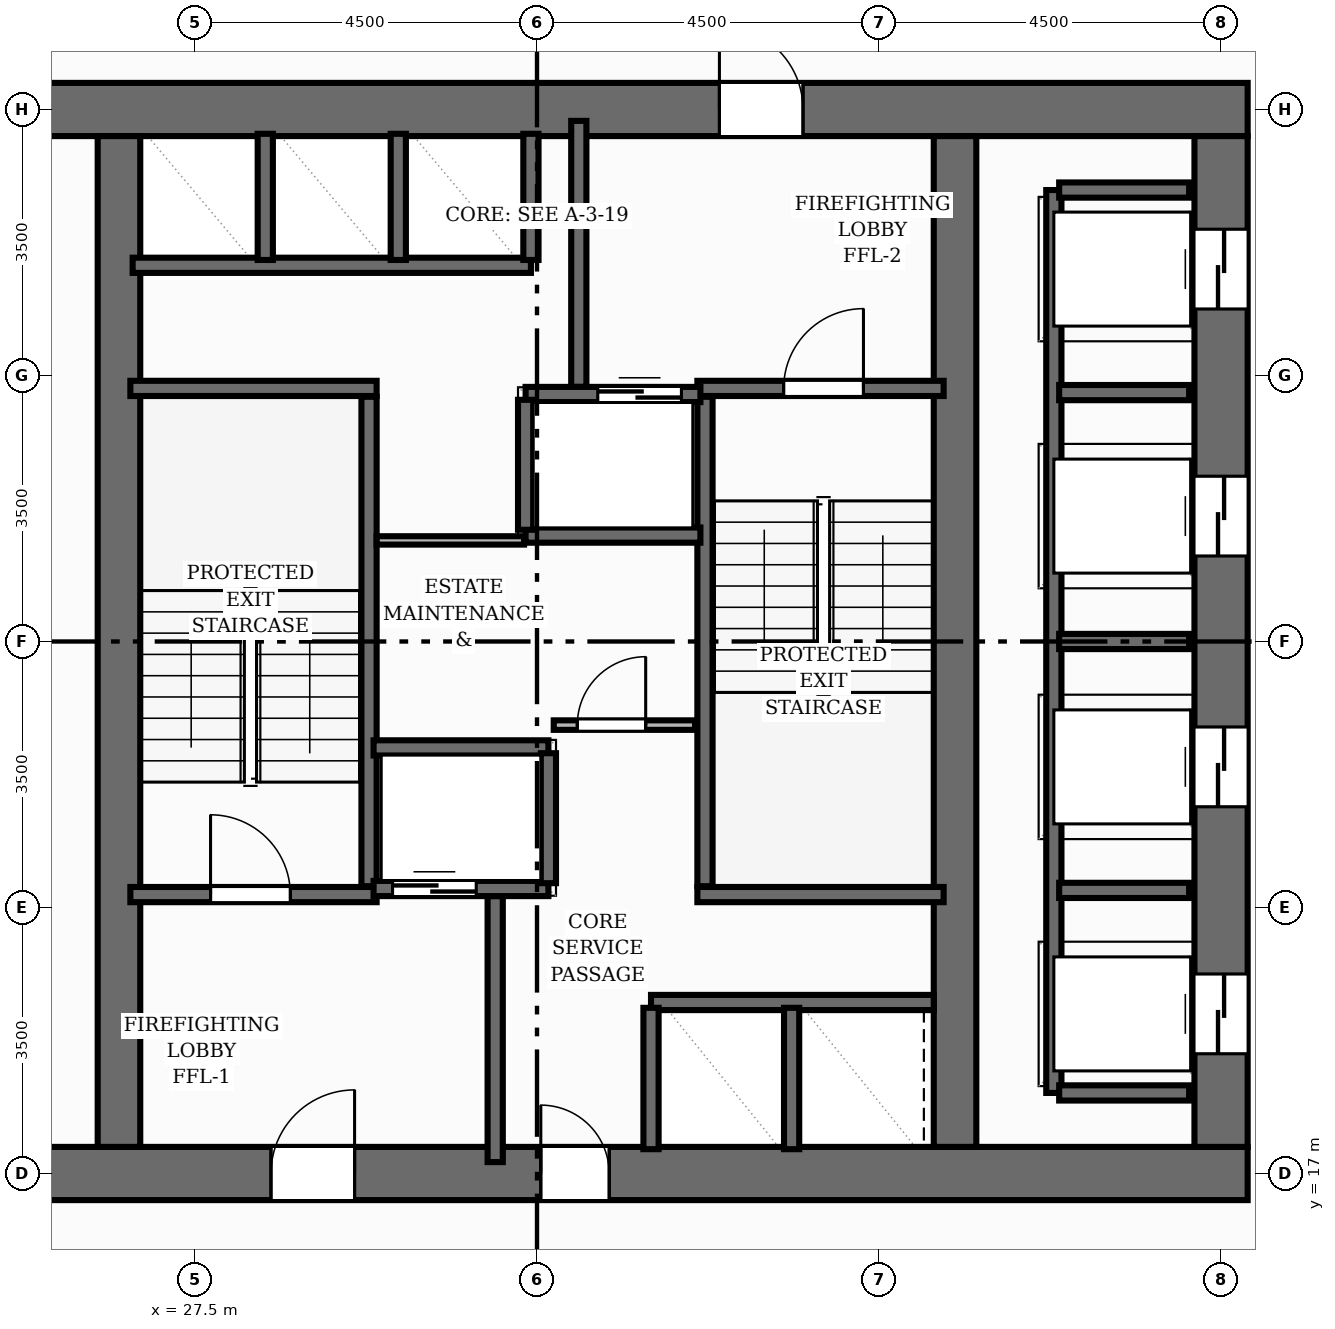
"""IFC4 building model, lengths in metres.
Left out: names, types, materials, properties, quantities, classifications, styles, units other than length and angle.
Written with IfcOpenShell. Run it as: python <this file> out.ifc"""

import sys

from ifc_helpers import new_model, si_unit, direction, frame, frame_2d, origin, place, context, subcontext, project, spatial, rectangle, extrude, element, fill, save


model = new_model("IFC4")
c1 = context("Model", 3, precision=1e-05, world=origin(), true_north=direction((0.0, 1.0)))
c2 = subcontext(c1, "Body", "Model", "MODEL_VIEW")
j1 = project(units=[si_unit("LENGTHUNIT", "METRE"), si_unit("PLANEANGLEUNIT", "RADIAN")], contexts=[c1])
p1 = place(None, origin())
s1 = spatial("IfcSite", under=j1, at=p1, CompositionType="ELEMENT")
p2 = place(p1, origin())
s2 = spatial("IfcBuilding", under=s1, at=p2, CompositionType="ELEMENT")
p3 = place(p2, frame((0.0, 0.0, 70.88)))
s3 = spatial("IfcBuildingStorey", under=s2, at=p3, CompositionType="ELEMENT", Elevation=70.88)
p4 = place(p3, frame((22.65, 17.0, 0.0), z_axis=(0.0, 0.0, 1.0), x_axis=(1.0, 0.0, 0.0)))
e1 = element("IfcWall", 1, at=p4, inside=s3, PredefinedType="SHEAR", context=c2, shape_type="SweptSolid", body=[
    extrude(rectangle(XDim=18.7, YDim=0.7, at=frame_2d((9.35, 0.0))), origin(), (0.0, 0.0, 1.0), 3.2),
])
p5 = place(p4, frame((5.85, 0.0, 0.0)))
e2 = element("IfcOpeningElement", 2, at=p5, cuts=e1, PredefinedType="OPENING", context=c2, shape_type="SweptSolid", body=[
    extrude(rectangle(XDim=1.1, YDim=2.15, at=frame_2d((0.55, 1.075))), frame((0.0, 0.36, 0.0), z_axis=(0.0, -1.0, 0.0), x_axis=(1.0, 0.0, 0.0)), (0.0, 0.0, 1.0), 0.72),
])
p6 = place(p4, frame((9.4, 0.0, 0.0)))
e3 = element("IfcOpeningElement", 3, at=p6, cuts=e1, PredefinedType="OPENING", context=c2, shape_type="SweptSolid", body=[
    extrude(rectangle(XDim=0.9, YDim=2.1, at=frame_2d((0.45, 1.05))), frame((0.0, 0.36, 0.0), z_axis=(0.0, -1.0, 0.0), x_axis=(1.0, 0.0, 0.0)), (0.0, 0.0, 1.0), 0.72),
])
p7 = place(p3, frame((22.65, 31.0, 0.0), z_axis=(0.0, 0.0, 1.0), x_axis=(1.0, 0.0, 0.0)))
e4 = element("IfcWall", 4, at=p7, inside=s3, PredefinedType="SHEAR", context=c2, shape_type="SweptSolid", body=[
    extrude(rectangle(XDim=18.7, YDim=0.7, at=frame_2d((9.35, 0.0))), origin(), (0.0, 0.0, 1.0), 3.2),
])
p8 = place(p7, frame((11.75, 0.0, 0.0)))
e5 = element("IfcOpeningElement", 5, at=p8, cuts=e4, PredefinedType="OPENING", context=c2, shape_type="SweptSolid", body=[
    extrude(rectangle(XDim=1.1, YDim=2.15, at=frame_2d((0.55, 1.075))), frame((0.0, 0.36, 0.0), z_axis=(0.0, -1.0, 0.0), x_axis=(1.0, 0.0, 0.0)), (0.0, 0.0, 1.0), 0.72),
])
p9 = place(p3, frame((41.0, 17.35, 0.0), z_axis=(0.0, 0.0, 1.0), x_axis=(0.0, 1.0, 0.0)))
e6 = element("IfcWall", 6, at=p9, inside=s3, PredefinedType="SHEAR", context=c2, shape_type="SweptSolid", body=[
    extrude(rectangle(XDim=13.3, YDim=0.7, at=frame_2d((6.65, 0.0))), origin(), (0.0, 0.0, 1.0), 3.2),
])
p10 = place(p9, frame((1.225, 0.0, 0.0)))
e7 = element("IfcOpeningElement", 7, at=p10, cuts=e6, PredefinedType="OPENING", context=c2, shape_type="SweptSolid", body=[
    extrude(rectangle(XDim=1.05, YDim=2.15, at=frame_2d((0.525, 1.075))), frame((0.0, 0.36, 0.0), z_axis=(0.0, -1.0, 0.0), x_axis=(1.0, 0.0, 0.0)), (0.0, 0.0, 1.0), 0.72),
])
p11 = place(p9, frame((4.475, 0.0, 0.0)))
e8 = element("IfcOpeningElement", 8, at=p11, cuts=e6, PredefinedType="OPENING", context=c2, shape_type="SweptSolid", body=[
    extrude(rectangle(XDim=1.05, YDim=2.15, at=frame_2d((0.525, 1.075))), frame((0.0, 0.36, 0.0), z_axis=(0.0, -1.0, 0.0), x_axis=(1.0, 0.0, 0.0)), (0.0, 0.0, 1.0), 0.72),
])
p12 = place(p9, frame((7.775, 0.0, 0.0)))
e9 = element("IfcOpeningElement", 9, at=p12, cuts=e6, PredefinedType="OPENING", context=c2, shape_type="SweptSolid", body=[
    extrude(rectangle(XDim=1.05, YDim=2.15, at=frame_2d((0.525, 1.075))), frame((0.0, 0.36, 0.0), z_axis=(0.0, -1.0, 0.0), x_axis=(1.0, 0.0, 0.0)), (0.0, 0.0, 1.0), 0.72),
])
p13 = place(p9, frame((11.025, 0.0, 0.0)))
e10 = element("IfcOpeningElement", 10, at=p13, cuts=e6, PredefinedType="OPENING", context=c2, shape_type="SweptSolid", body=[
    extrude(rectangle(XDim=1.05, YDim=2.15, at=frame_2d((0.525, 1.075))), frame((0.0, 0.36, 0.0), z_axis=(0.0, -1.0, 0.0), x_axis=(1.0, 0.0, 0.0)), (0.0, 0.0, 1.0), 0.72),
])
for number, where, z_axis, x_axis in (
    (11, (26.5, 17.35, 0.0), (0.0, 0.0, 1.0), (0.0, 1.0, 0.0)),
    (12, (37.5, 17.35, 0.0), (0.0, 0.0, 1.0), (0.0, 1.0, 0.0)),
):
    element("IfcWall", number, at=place(p3, frame(where, z_axis=z_axis, x_axis=x_axis)), inside=s3, PredefinedType="SHEAR", context=c2, shape_type="SweptSolid", body=[
        extrude(rectangle(XDim=13.3, YDim=0.56, at=frame_2d((6.65, 0.0))), origin(), (0.0, 0.0, 1.0), 3.2),
    ])
p14 = place(p3, frame((29.79, 20.78, 0.0), z_axis=(0.0, 0.0, 1.0), x_axis=(0.0, 1.0, 0.0)))
e13 = element("IfcWall", 13, at=p14, inside=s3, PredefinedType="SHEAR", context=c2, shape_type="SweptSolid", body=[
    extrude(rectangle(XDim=6.44, YDim=0.2, at=frame_2d((3.22, 0.0))), origin(), (0.0, 0.0, 1.0), 3.2),
])
p15 = place(p3, frame((26.65, 27.33, 0.0), z_axis=(0.0, 0.0, 1.0), x_axis=(1.0, 0.0, 0.0)))
e14 = element("IfcWall", 14, at=p15, inside=s3, PredefinedType="SHEAR", context=c2, shape_type="SweptSolid", body=[
    extrude(rectangle(XDim=3.24, YDim=0.2, at=frame_2d((1.62, 0.0))), origin(), (0.0, 0.0, 1.0), 3.2),
])
p16 = place(p3, frame((26.65, 20.67, 0.0), z_axis=(0.0, 0.0, 1.0), x_axis=(1.0, 0.0, 0.0)))
e15 = element("IfcWall", 15, at=p16, inside=s3, PredefinedType="SHEAR", context=c2, shape_type="SweptSolid", body=[
    extrude(rectangle(XDim=3.24, YDim=0.2, at=frame_2d((1.62, 0.0))), origin(), (0.0, 0.0, 1.0), 3.2),
])
p17 = place(p16, frame((1.055, 0.0, 0.0)))
e16 = element("IfcOpeningElement", 16, at=p17, cuts=e15, PredefinedType="OPENING", context=c2, shape_type="SweptSolid", body=[
    extrude(rectangle(XDim=1.05, YDim=2.15, at=frame_2d((0.525, 1.075))), frame((0.0, 0.11, 0.0), z_axis=(0.0, -1.0, 0.0), x_axis=(1.0, 0.0, 0.0)), (0.0, 0.0, 1.0), 0.22),
])
p18 = place(p3, frame((34.21, 20.78, 0.0), z_axis=(0.0, 0.0, 1.0), x_axis=(0.0, 1.0, 0.0)))
e17 = element("IfcWall", 17, at=p18, inside=s3, PredefinedType="SHEAR", context=c2, shape_type="SweptSolid", body=[
    extrude(rectangle(XDim=6.44, YDim=0.2, at=frame_2d((3.22, 0.0))), origin(), (0.0, 0.0, 1.0), 3.2),
])
p19 = place(p3, frame((34.11, 20.67, 0.0), z_axis=(0.0, 0.0, 1.0), x_axis=(1.0, 0.0, 0.0)))
e18 = element("IfcWall", 18, at=p19, inside=s3, PredefinedType="SHEAR", context=c2, shape_type="SweptSolid", body=[
    extrude(rectangle(XDim=3.24, YDim=0.2, at=frame_2d((1.62, 0.0))), origin(), (0.0, 0.0, 1.0), 3.2),
])
p20 = place(p3, frame((34.11, 27.33, 0.0), z_axis=(0.0, 0.0, 1.0), x_axis=(1.0, 0.0, 0.0)))
e19 = element("IfcWall", 19, at=p20, inside=s3, PredefinedType="SHEAR", context=c2, shape_type="SweptSolid", body=[
    extrude(rectangle(XDim=3.24, YDim=0.2, at=frame_2d((1.62, 0.0))), origin(), (0.0, 0.0, 1.0), 3.2),
])
p21 = place(p20, frame((1.135, 0.0, 0.0)))
e20 = element("IfcOpeningElement", 20, at=p21, cuts=e19, PredefinedType="OPENING", context=c2, shape_type="SweptSolid", body=[
    extrude(rectangle(XDim=1.05, YDim=2.15, at=frame_2d((0.525, 1.075))), frame((0.0, 0.11, 0.0), z_axis=(0.0, -1.0, 0.0), x_axis=(1.0, 0.0, 0.0)), (0.0, 0.0, 1.0), 0.22),
])
for number, where, z_axis, x_axis in (
    (21, (31.45, 17.15, 0.0), (0.0, 0.0, 1.0), (0.0, 1.0, 0.0)),
    (22, (32.55, 27.35, 0.0), (0.0, 0.0, 1.0), (0.0, 1.0, 0.0)),
):
    element("IfcWall", number, at=place(p3, frame(where, z_axis=z_axis, x_axis=x_axis)), inside=s3, PredefinedType="SHEAR", context=c2, shape_type="SweptSolid", body=[
        extrude(rectangle(XDim=3.5, YDim=0.2, at=frame_2d((1.75, 0.0))), origin(), (0.0, 0.0, 1.0), 3.2),
    ])
p22 = place(p3, frame((29.85, 20.75, 0.0), z_axis=(0.0, 0.0, 1.0), x_axis=(1.0, 0.0, 0.0)))
e23 = element("IfcWall", 23, at=p22, inside=s3, PredefinedType="SHEAR", context=c2, shape_type="SweptSolid", body=[
    extrude(rectangle(XDim=2.3, YDim=0.2, at=frame_2d((1.15, 0.0))), origin(), (0.0, 0.0, 1.0), 3.2),
])
p23 = place(p22, frame((0.25, 0.0, 0.0)))
e24 = element("IfcOpeningElement", 24, at=p23, cuts=e23, PredefinedType="OPENING", context=c2, shape_type="SweptSolid", body=[
    extrude(rectangle(XDim=1.1, YDim=2.15, at=frame_2d((0.55, 1.075))), frame((0.0, 0.11, 0.0), z_axis=(0.0, -1.0, 0.0), x_axis=(1.0, 0.0, 0.0)), (0.0, 0.0, 1.0), 0.22),
])
p24 = place(p3, frame((29.85, 22.6, 0.0), z_axis=(0.0, 0.0, 1.0), x_axis=(1.0, 0.0, 0.0)))
e25 = element("IfcWall", 25, at=p24, inside=s3, PredefinedType="SHEAR", context=c2, shape_type="SweptSolid", body=[
    extrude(rectangle(XDim=2.3, YDim=0.2, at=frame_2d((1.15, 0.0))), origin(), (0.0, 0.0, 1.0), 3.2),
])
p25 = place(p3, frame((32.15, 20.82, 0.0), z_axis=(0.0, 0.0, 1.0), x_axis=(0.0, 1.0, 0.0)))
e26 = element("IfcWall", 26, at=p25, inside=s3, PredefinedType="SHEAR", context=c2, shape_type="SweptSolid", body=[
    extrude(rectangle(XDim=1.71, YDim=0.2, at=frame_2d((0.855, 0.0))), origin(), (0.0, 0.0, 1.0), 3.2),
])
p26 = place(p3, frame((31.85, 27.25, 0.0), z_axis=(0.0, 0.0, 1.0), x_axis=(1.0, 0.0, 0.0)))
e27 = element("IfcWall", 27, at=p26, inside=s3, PredefinedType="SHEAR", context=c2, shape_type="SweptSolid", body=[
    extrude(rectangle(XDim=2.3, YDim=0.2, at=frame_2d((1.15, 0.0))), origin(), (0.0, 0.0, 1.0), 3.2),
])
p27 = place(p26, frame((0.95, 0.0, 0.0)))
e28 = element("IfcOpeningElement", 28, at=p27, cuts=e27, PredefinedType="OPENING", context=c2, shape_type="SweptSolid", body=[
    extrude(rectangle(XDim=1.1, YDim=2.15, at=frame_2d((0.55, 1.075))), frame((0.0, 0.11, 0.0), z_axis=(0.0, -1.0, 0.0), x_axis=(1.0, 0.0, 0.0)), (0.0, 0.0, 1.0), 0.22),
])
p28 = place(p3, frame((31.85, 25.4, 0.0), z_axis=(0.0, 0.0, 1.0), x_axis=(1.0, 0.0, 0.0)))
e29 = element("IfcWall", 29, at=p28, inside=s3, PredefinedType="SHEAR", context=c2, shape_type="SweptSolid", body=[
    extrude(rectangle(XDim=2.3, YDim=0.2, at=frame_2d((1.15, 0.0))), origin(), (0.0, 0.0, 1.0), 3.2),
])
p29 = place(p3, frame((31.85, 25.47, 0.0), z_axis=(0.0, 0.0, 1.0), x_axis=(0.0, 1.0, 0.0)))
e30 = element("IfcWall", 30, at=p29, inside=s3, PredefinedType="SHEAR", context=c2, shape_type="SweptSolid", body=[
    extrude(rectangle(XDim=1.71, YDim=0.2, at=frame_2d((0.855, 0.0))), origin(), (0.0, 0.0, 1.0), 3.2),
])
p30 = place(p3, frame((38.8, 18.06, 0.0), z_axis=(0.0, 0.0, 1.0), x_axis=(0.0, 1.0, 0.0)))
e31 = element("IfcWall", 31, at=p30, inside=s3, PredefinedType="SHEAR", context=c2, shape_type="SweptSolid", body=[
    extrude(rectangle(XDim=11.88, YDim=0.2, at=frame_2d((5.94, 0.0))), origin(), (0.0, 0.0, 1.0), 3.2),
])
for number, where, z_axis, x_axis in (
    (32, (38.87, 18.06, 0.0), (0.0, 0.0, 1.0), (1.0, 0.0, 0.0)),
    (33, (38.87, 29.94, 0.0), (0.0, 0.0, 1.0), (1.0, 0.0, 0.0)),
    (34, (38.87, 20.725, 0.0), (0.0, 0.0, 1.0), (1.0, 0.0, 0.0)),
    (35, (38.87, 24.0, 0.0), (0.0, 0.0, 1.0), (1.0, 0.0, 0.0)),
    (36, (38.87, 27.275, 0.0), (0.0, 0.0, 1.0), (1.0, 0.0, 0.0)),
):
    element("IfcWall", number, at=place(p3, frame(where, z_axis=z_axis, x_axis=x_axis)), inside=s3, PredefinedType="SHEAR", context=c2, shape_type="SweptSolid", body=[
        extrude(rectangle(XDim=1.71, YDim=0.2, at=frame_2d((0.855, 0.0))), origin(), (0.0, 0.0, 1.0), 3.2),
    ])
p31 = place(p3, frame((26.68, 28.95, 0.0), z_axis=(0.0, 0.0, 1.0), x_axis=(1.0, 0.0, 0.0)))
e37 = element("IfcWall", 37, at=p31, inside=s3, PredefinedType="SHEAR", context=c2, shape_type="SweptSolid", body=[
    extrude(rectangle(XDim=5.24, YDim=0.2, at=frame_2d((2.62, 0.0))), origin(), (0.0, 0.0, 1.0), 3.2),
])
for number, where, z_axis, x_axis in (
    (38, (31.92, 29.02, 0.0), (0.0, 0.0, 1.0), (0.0, 1.0, 0.0)),
    (39, (28.425, 29.02, 0.0), (0.0, 0.0, 1.0), (0.0, 1.0, 0.0)),
    (40, (30.175, 29.02, 0.0), (0.0, 0.0, 1.0), (0.0, 1.0, 0.0)),
):
    element("IfcWall", number, at=place(p3, frame(where, z_axis=z_axis, x_axis=x_axis)), inside=s3, PredefinedType="SHEAR", context=c2, shape_type="SweptSolid", body=[
        extrude(rectangle(XDim=1.66, YDim=0.2, at=frame_2d((0.83, 0.0))), origin(), (0.0, 0.0, 1.0), 3.2),
    ])
p32 = place(p3, frame((33.5, 19.25, 0.0), z_axis=(0.0, 0.0, 1.0), x_axis=(1.0, 0.0, 0.0)))
e41 = element("IfcWall", 41, at=p32, inside=s3, PredefinedType="SHEAR", context=c2, shape_type="SweptSolid", body=[
    extrude(rectangle(XDim=3.72, YDim=0.2, at=frame_2d((1.86, 0.0))), origin(), (0.0, 0.0, 1.0), 3.2),
])
for number, where, z_axis, x_axis in (
    (42, (33.5, 17.32, 0.0), (0.0, 0.0, 1.0), (0.0, 1.0, 0.0)),
    (43, (35.35, 17.32, 0.0), (0.0, 0.0, 1.0), (0.0, 1.0, 0.0)),
):
    element("IfcWall", number, at=place(p3, frame(where, z_axis=z_axis, x_axis=x_axis)), inside=s3, PredefinedType="SHEAR", context=c2, shape_type="SweptSolid", body=[
        extrude(rectangle(XDim=1.86, YDim=0.2, at=frame_2d((0.93, 0.0))), origin(), (0.0, 0.0, 1.0), 3.2),
    ])
p33 = place(p3, frame((32.22, 22.9, 0.0), z_axis=(0.0, 0.0, 1.0), x_axis=(1.0, 0.0, 0.0)))
e44 = element("IfcWall", 44, at=p33, inside=s3, PredefinedType="PARTITIONING", context=c2, shape_type="SweptSolid", body=[
    extrude(rectangle(XDim=1.86, YDim=0.125, at=frame_2d((0.93, 0.0))), origin(), (0.0, 0.0, 1.0), 2.955),
])
p34 = place(p33, frame((0.31, 0.0, 0.0)))
e45 = element("IfcOpeningElement", 45, at=p34, cuts=e44, PredefinedType="OPENING", context=c2, shape_type="SweptSolid", body=[
    extrude(rectangle(XDim=0.9, YDim=2.1, at=frame_2d((0.45, 1.05))), frame((0.0, 0.073, 0.0), z_axis=(0.0, -1.0, 0.0), x_axis=(1.0, 0.0, 0.0)), (0.0, 0.0, 1.0), 0.145),
])
p35 = place(p3, frame((29.89, 25.33, 0.0), z_axis=(0.0, 0.0, 1.0), x_axis=(1.0, 0.0, 0.0)))
e46 = element("IfcWall", 46, at=p35, inside=s3, PredefinedType="MOVABLE", context=c2, shape_type="SweptSolid", body=[
    extrude(rectangle(XDim=1.94, YDim=0.11, at=frame_2d((0.97, 0.0))), origin(), (0.0, 0.0, 1.0), 2.955),
])
p36 = place(p17, origin())
e47 = element("IfcDoor", 47, at=p36, inside=s3, OperationType="SINGLE_SWING_LEFT", PredefinedType="DOOR", context=c2, shape_type="SweptSolid", body=[
    extrude(rectangle(XDim=1.05, YDim=2.15, at=frame_2d((0.525, 1.075))), frame((0.0, 0.025, 0.0), z_axis=(0.0, -1.0, 0.0), x_axis=(1.0, 0.0, 0.0)), (0.0, 0.0, 1.0), 0.05),
])
fill(e16, e47)
p37 = place(p21, origin())
e48 = element("IfcDoor", 48, at=p37, inside=s3, OperationType="SINGLE_SWING_RIGHT", PredefinedType="DOOR", context=c2, shape_type="SweptSolid", body=[
    extrude(rectangle(XDim=1.05, YDim=2.15, at=frame_2d((0.525, 1.075))), frame((0.0, 0.025, 0.0), z_axis=(0.0, -1.0, 0.0), x_axis=(1.0, 0.0, 0.0)), (0.0, 0.0, 1.0), 0.05),
])
fill(e20, e48)
p38 = place(p5, origin())
e49 = element("IfcDoor", 49, at=p38, inside=s3, OperationType="SINGLE_SWING_RIGHT", PredefinedType="DOOR", context=c2, shape_type="SweptSolid", body=[
    extrude(rectangle(XDim=1.1, YDim=2.15, at=frame_2d((0.55, 1.075))), frame((0.0, 0.025, 0.0), z_axis=(0.0, -1.0, 0.0), x_axis=(1.0, 0.0, 0.0)), (0.0, 0.0, 1.0), 0.05),
])
fill(e2, e49)
p39 = place(p8, origin())
e50 = element("IfcDoor", 50, at=p39, inside=s3, OperationType="SINGLE_SWING_LEFT", PredefinedType="DOOR", context=c2, shape_type="SweptSolid", body=[
    extrude(rectangle(XDim=1.1, YDim=2.15, at=frame_2d((0.55, 1.075))), frame((0.0, 0.025, 0.0), z_axis=(0.0, -1.0, 0.0), x_axis=(1.0, 0.0, 0.0)), (0.0, 0.0, 1.0), 0.05),
])
fill(e5, e50)
p40 = place(p23, origin())
e51 = element("IfcDoor", 51, at=p40, inside=s3, OperationType="DOUBLE_DOOR_SLIDING", PredefinedType="DOOR", context=c2, shape_type="SweptSolid", body=[
    extrude(rectangle(XDim=1.1, YDim=2.15, at=frame_2d((0.55, 1.075))), frame((0.0, 0.025, 0.0), z_axis=(0.0, -1.0, 0.0), x_axis=(1.0, 0.0, 0.0)), (0.0, 0.0, 1.0), 0.05),
])
fill(e24, e51)
p41 = place(p27, origin())
e52 = element("IfcDoor", 52, at=p41, inside=s3, OperationType="DOUBLE_DOOR_SLIDING", PredefinedType="DOOR", context=c2, shape_type="SweptSolid", body=[
    extrude(rectangle(XDim=1.1, YDim=2.15, at=frame_2d((0.55, 1.075))), frame((0.0, 0.025, 0.0), z_axis=(0.0, -1.0, 0.0), x_axis=(1.0, 0.0, 0.0)), (0.0, 0.0, 1.0), 0.05),
])
fill(e28, e52)
p42 = place(p10, origin())
e53 = element("IfcDoor", 53, at=p42, inside=s3, OperationType="DOUBLE_DOOR_SLIDING", PredefinedType="DOOR", context=c2, shape_type="SweptSolid", body=[
    extrude(rectangle(XDim=1.05, YDim=2.15, at=frame_2d((0.525, 1.075))), frame((0.0, 0.025, 0.0), z_axis=(0.0, -1.0, 0.0), x_axis=(1.0, 0.0, 0.0)), (0.0, 0.0, 1.0), 0.05),
])
fill(e7, e53)
p43 = place(p11, origin())
e54 = element("IfcDoor", 54, at=p43, inside=s3, OperationType="DOUBLE_DOOR_SLIDING", PredefinedType="DOOR", context=c2, shape_type="SweptSolid", body=[
    extrude(rectangle(XDim=1.05, YDim=2.15, at=frame_2d((0.525, 1.075))), frame((0.0, 0.025, 0.0), z_axis=(0.0, -1.0, 0.0), x_axis=(1.0, 0.0, 0.0)), (0.0, 0.0, 1.0), 0.05),
])
fill(e8, e54)
p44 = place(p12, origin())
e55 = element("IfcDoor", 55, at=p44, inside=s3, OperationType="DOUBLE_DOOR_SLIDING", PredefinedType="DOOR", context=c2, shape_type="SweptSolid", body=[
    extrude(rectangle(XDim=1.05, YDim=2.15, at=frame_2d((0.525, 1.075))), frame((0.0, 0.025, 0.0), z_axis=(0.0, -1.0, 0.0), x_axis=(1.0, 0.0, 0.0)), (0.0, 0.0, 1.0), 0.05),
])
fill(e9, e55)
p45 = place(p13, origin())
e56 = element("IfcDoor", 56, at=p45, inside=s3, OperationType="DOUBLE_DOOR_SLIDING", PredefinedType="DOOR", context=c2, shape_type="SweptSolid", body=[
    extrude(rectangle(XDim=1.05, YDim=2.15, at=frame_2d((0.525, 1.075))), frame((0.0, 0.025, 0.0), z_axis=(0.0, -1.0, 0.0), x_axis=(1.0, 0.0, 0.0)), (0.0, 0.0, 1.0), 0.05),
])
fill(e10, e56)
p46 = place(p6, origin())
e57 = element("IfcDoor", 57, at=p46, inside=s3, OperationType="SINGLE_SWING_LEFT", PredefinedType="DOOR", context=c2, shape_type="SweptSolid", body=[
    extrude(rectangle(XDim=0.9, YDim=2.1, at=frame_2d((0.45, 1.05))), frame((0.0, 0.025, 0.0), z_axis=(0.0, -1.0, 0.0), x_axis=(1.0, 0.0, 0.0)), (0.0, 0.0, 1.0), 0.05),
])
fill(e3, e57)
p47 = place(p34, origin())
e58 = element("IfcDoor", 58, at=p47, inside=s3, OperationType="SINGLE_SWING_RIGHT", PredefinedType="DOOR", context=c2, shape_type="SweptSolid", body=[
    extrude(rectangle(XDim=0.9, YDim=2.1, at=frame_2d((0.45, 1.05))), frame((0.0, 0.025, 0.0), z_axis=(0.0, -1.0, 0.0), x_axis=(1.0, 0.0, 0.0)), (0.0, 0.0, 1.0), 0.05),
])
fill(e45, e58)
save(model, sys.argv[1])
